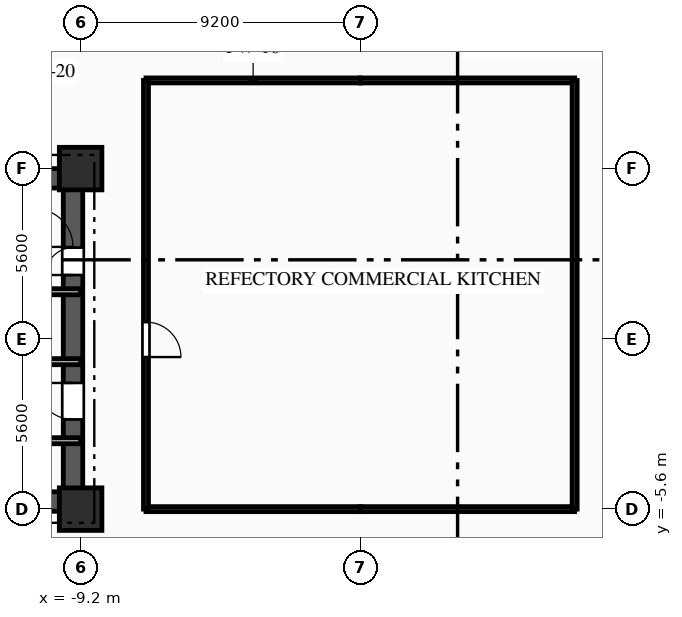
"""IFC4 building model, lengths in metres.
Left out: names, types, materials, properties, quantities, classifications, styles, units other than length and angle.
Written with IfcOpenShell. Run it as: python <this file> out.ifc"""

import sys

from ifc_helpers import new_model, si_unit, direction, frame, frame_2d, origin, origin_2d, place, context, subcontext, project, spatial, rectangle, extrude, element, fill, save


model = new_model("IFC4")
c1 = context("Model", 3, precision=1e-05, world=origin(), true_north=direction((0.0, 1.0)))
c2 = subcontext(c1, "Body", "Model", "MODEL_VIEW")
j1 = project(units=[si_unit("LENGTHUNIT", "METRE"), si_unit("PLANEANGLEUNIT", "RADIAN")], contexts=[c1])
p1 = place(None, origin())
s1 = spatial("IfcSite", under=j1, at=p1, CompositionType="ELEMENT")
p2 = place(p1, origin())
s2 = spatial("IfcBuilding", under=s1, at=p2, CompositionType="ELEMENT")
p3 = place(p2, origin())
s3 = spatial("IfcBuildingStorey", under=s2, at=p3, CompositionType="ELEMENT", Elevation=0.0)
for number, where, z_axis, x_axis in (
    (1, (-9.2, -5.6, 0.0), (0.0, 0.0, 1.0), (1.0, 0.0, 0.0)),
    (2, (-9.2, 5.6, 0.0), (0.0, 0.0, 1.0), (1.0, 0.0, 0.0)),
):
    element("IfcColumn", number, at=place(p3, frame(where, z_axis=z_axis, x_axis=x_axis)), inside=s3, PredefinedType="COLUMN", context=c2, shape_type="SweptSolid", body=[
        extrude(rectangle(XDim=1.4, YDim=1.4, at=origin_2d()), origin(), (0.0, 0.0, 1.0), 4.5),
    ])
p4 = place(p3, frame((-18.8, 5.28, 0.0), z_axis=(0.0, 0.0, 1.0), x_axis=(1.0, 0.0, 0.0)))
e3 = element("IfcWall", 3, at=p4, inside=s3, PredefinedType="SHEAR", context=c2, shape_type="SweptSolid", body=[
    extrude(rectangle(XDim=9.6, YDim=0.64, at=frame_2d((4.8, 0.0))), origin(), (0.0, 0.0, 1.0), 4.17),
])
p5 = place(p4, frame((1.55, 0.0, 0.0)))
e4 = element("IfcOpeningElement", 4, at=p5, cuts=e3, PredefinedType="OPENING", context=c2, shape_type="SweptSolid", body=[
    extrude(rectangle(XDim=1.1, YDim=2.15, at=frame_2d((0.55, 1.075))), frame((0.0, 0.33, 0.0), z_axis=(0.0, -1.0, 0.0), x_axis=(1.0, 0.0, 0.0)), (0.0, 0.0, 1.0), 0.66),
])
p6 = place(p4, frame((4.775, 0.0, 0.0)))
e5 = element("IfcOpeningElement", 5, at=p6, cuts=e3, PredefinedType="OPENING", context=c2, shape_type="SweptSolid", body=[
    extrude(rectangle(XDim=1.05, YDim=2.1, at=frame_2d((0.525, 1.05))), frame((0.0, 0.33, 0.0), z_axis=(0.0, -1.0, 0.0), x_axis=(1.0, 0.0, 0.0)), (0.0, 0.0, 1.0), 0.66),
])
p7 = place(p3, frame((-18.8, -5.35, 0.0), z_axis=(0.0, 0.0, 1.0), x_axis=(1.0, 0.0, 0.0)))
e6 = element("IfcWall", 6, at=p7, inside=s3, PredefinedType="SHEAR", context=c2, shape_type="SweptSolid", body=[
    extrude(rectangle(XDim=9.6, YDim=0.64, at=frame_2d((4.8, 0.0))), origin(), (0.0, 0.0, 1.0), 4.17),
])
p8 = place(p7, frame((1.05, 0.0, 0.0)))
e7 = element("IfcOpeningElement", 7, at=p8, cuts=e6, PredefinedType="OPENING", context=c2, shape_type="SweptSolid", body=[
    extrude(rectangle(XDim=0.9, YDim=2.1, at=frame_2d((0.45, 1.05))), frame((0.0, 0.33, 0.0), z_axis=(0.0, -1.0, 0.0), x_axis=(1.0, 0.0, 0.0)), (0.0, 0.0, 1.0), 0.66),
])
p9 = place(p3, frame((-9.45, -5.05, 0.0), z_axis=(0.0, 0.0, 1.0), x_axis=(0.0, 1.0, 0.0)))
e8 = element("IfcWall", 8, at=p9, inside=s3, PredefinedType="SHEAR", context=c2, shape_type="SweptSolid", body=[
    extrude(rectangle(XDim=10.1, YDim=0.64, at=frame_2d((5.05, 0.0))), origin(), (0.0, 0.0, 1.0), 4.17),
])
p10 = place(p9, frame((7.15, 0.0, 0.0)))
e9 = element("IfcOpeningElement", 9, at=p10, cuts=e8, PredefinedType="OPENING", context=c2, shape_type="SweptSolid", body=[
    extrude(rectangle(XDim=0.9, YDim=2.1, at=frame_2d((0.45, 1.05))), frame((0.0, 0.33, 0.0), z_axis=(0.0, -1.0, 0.0), x_axis=(1.0, 0.0, 0.0)), (0.0, 0.0, 1.0), 0.66),
])
p11 = place(p9, frame((2.4, 0.0, 0.0)))
e10 = element("IfcOpeningElement", 10, at=p11, cuts=e8, PredefinedType="OPENING", context=c2, shape_type="SweptSolid", body=[
    extrude(rectangle(XDim=1.2, YDim=2.15, at=frame_2d((0.6, 1.075))), frame((0.0, 0.33, 0.0), z_axis=(0.0, -1.0, 0.0), x_axis=(1.0, 0.0, 0.0)), (0.0, 0.0, 1.0), 0.66),
])
p12 = place(p3, frame((-11.08, -3.35, 0.0), z_axis=(0.0, 0.0, 1.0), x_axis=(1.0, 0.0, 0.0)))
e11 = element("IfcWall", 11, at=p12, inside=s3, PredefinedType="PARTITIONING", context=c2, shape_type="SweptSolid", body=[
    extrude(rectangle(XDim=1.88, YDim=0.2, at=frame_2d((0.94, 0.0))), origin(), (0.0, 0.0, 1.0), 3.885),
])
p13 = place(p3, frame((-9.2, -0.75, 0.0), z_axis=(0.0, 0.0, 1.0), x_axis=(-1.0, 0.0, 0.0)))
e12 = element("IfcWall", 12, at=p13, inside=s3, PredefinedType="PARTITIONING", context=c2, shape_type="SweptSolid", body=[
    extrude(rectangle(XDim=1.88, YDim=0.2, at=frame_2d((0.94, 0.0))), origin(), (0.0, 0.0, 1.0), 4.17),
])
for number, where, z_axis, x_axis in (
    (13, (0.0, 8.5, 0.0), (0.0, 0.0, 1.0), (-1.0, 0.0, 0.0)),
    (14, (7.05, 8.5, 0.0), (0.0, 0.0, 1.0), (-1.0, 0.0, 0.0)),
):
    element("IfcWall", number, at=place(p3, frame(where, z_axis=z_axis, x_axis=x_axis)), inside=s3, PredefinedType="PARTITIONING", context=c2, shape_type="SweptSolid", body=[
        extrude(rectangle(XDim=7.05, YDim=0.165, at=frame_2d((3.525, 0.0))), origin(), (0.0, 0.0, 1.0), 4.17),
    ])
for number, where, z_axis, x_axis in (
    (15, (-7.05, -5.6, 0.0), (0.0, 0.0, 1.0), (1.0, 0.0, 0.0)),
    (16, (0.0, -5.6, 0.0), (0.0, 0.0, 1.0), (1.0, 0.0, 0.0)),
):
    element("IfcWall", number, at=place(p3, frame(where, z_axis=z_axis, x_axis=x_axis)), inside=s3, PredefinedType="PARTITIONING", context=c2, shape_type="SweptSolid", body=[
        extrude(rectangle(XDim=7.05, YDim=0.165, at=frame_2d((3.525, 0.0))), origin(), (0.0, 0.0, 1.0), 3.655),
    ])
p14 = place(p3, frame((-7.05, 8.5, 0.0), z_axis=(0.0, 0.0, 1.0), x_axis=(0.0, -1.0, 0.0)))
e17 = element("IfcWall", 17, at=p14, inside=s3, PredefinedType="PARTITIONING", context=c2, shape_type="SweptSolid", body=[
    extrude(rectangle(XDim=14.1, YDim=0.165, at=frame_2d((7.05, 0.0))), origin(), (0.0, 0.0, 1.0), 4.17),
])
p15 = place(p14, frame((7.949, 0.0, 0.0)))
e18 = element("IfcOpeningElement", 18, at=p15, cuts=e17, PredefinedType="OPENING", context=c2, shape_type="SweptSolid", body=[
    extrude(rectangle(XDim=1.15, YDim=2.15, at=frame_2d((0.575, 1.075))), frame((0.0, 0.093, 0.0), z_axis=(0.0, -1.0, 0.0), x_axis=(1.0, 0.0, 0.0)), (0.0, 0.0, 1.0), 0.185),
])
p16 = place(p3, frame((7.05, -5.6, 0.0), z_axis=(0.0, 0.0, 1.0), x_axis=(0.0, 1.0, 0.0)))
e19 = element("IfcWall", 19, at=p16, inside=s3, PredefinedType="PARTITIONING", context=c2, shape_type="SweptSolid", body=[
    extrude(rectangle(XDim=14.1, YDim=0.165, at=frame_2d((7.05, 0.0))), origin(), (0.0, 0.0, 1.0), 4.17),
])
p17 = place(p3, frame((-15.05, 1.55, 0.0), z_axis=(0.0, 0.0, 1.0), x_axis=(1.0, 0.0, 0.0)))
e20 = element("IfcWall", 20, at=p17, inside=s3, PredefinedType="PARTITIONING", context=c2, shape_type="SweptSolid", body=[
    extrude(rectangle(XDim=5.85, YDim=0.2, at=frame_2d((2.925, 0.0))), origin(), (0.0, 0.0, 1.0), 4.17),
])
p18 = place(p10, origin())
e21 = element("IfcDoor", 21, at=p18, inside=s3, OperationType="SINGLE_SWING_LEFT", PredefinedType="DOOR", context=c2, shape_type="SweptSolid", body=[
    extrude(rectangle(XDim=0.9, YDim=2.1, at=frame_2d((0.45, 1.05))), frame((0.0, 0.025, 0.0), z_axis=(0.0, -1.0, 0.0), x_axis=(1.0, 0.0, 0.0)), (0.0, 0.0, 1.0), 0.05),
])
fill(e9, e21)
p19 = place(p11, origin())
e22 = element("IfcDoor", 22, at=p19, inside=s3, OperationType="SINGLE_SWING_RIGHT", PredefinedType="DOOR", context=c2, shape_type="SweptSolid", body=[
    extrude(rectangle(XDim=1.2, YDim=2.15, at=frame_2d((0.6, 1.075))), frame((0.0, 0.025, 0.0), z_axis=(0.0, -1.0, 0.0), x_axis=(1.0, 0.0, 0.0)), (0.0, 0.0, 1.0), 0.05),
])
fill(e10, e22)
p20 = place(p15, origin())
e23 = element("IfcDoor", 23, at=p20, inside=s3, OperationType="SINGLE_SWING_RIGHT", PredefinedType="DOOR", context=c2, shape_type="SweptSolid", body=[
    extrude(rectangle(XDim=1.15, YDim=2.15, at=frame_2d((0.575, 1.075))), frame((0.0, 0.025, 0.0), z_axis=(0.0, -1.0, 0.0), x_axis=(1.0, 0.0, 0.0)), (0.0, 0.0, 1.0), 0.05),
])
fill(e18, e23)
save(model, sys.argv[1])
